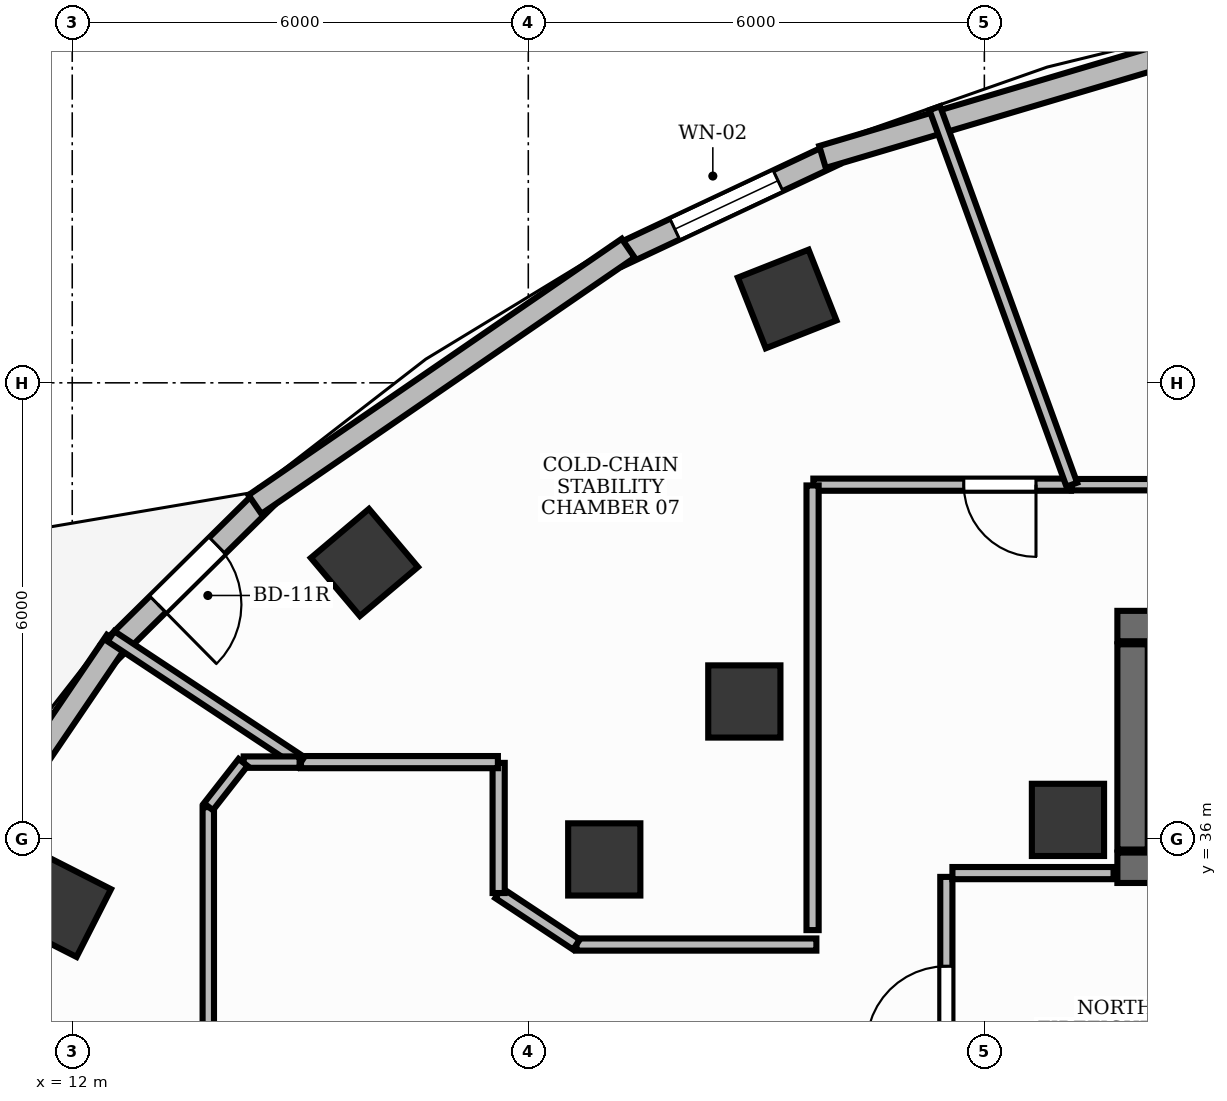
"""IFC4 building model, lengths in metres.
Left out: names, types, materials, properties, quantities, classifications, styles, units other than length and angle.
Written with IfcOpenShell. Run it as: python <this file> out.ifc"""

import sys

from ifc_helpers import new_model, si_unit, direction, frame, frame_2d, origin, origin_2d, place, context, subcontext, project, spatial, rectangle, extrude, element, fill, save


model = new_model("IFC4")
c1 = context("Model", 3, precision=1e-05, world=origin(), true_north=direction((0.0, 1.0)))
c2 = subcontext(c1, "Body", "Model", "MODEL_VIEW")
j1 = project(units=[si_unit("LENGTHUNIT", "METRE"), si_unit("PLANEANGLEUNIT", "RADIAN")], contexts=[c1])
p1 = place(None, origin())
s1 = spatial("IfcSite", under=j1, at=p1, CompositionType="ELEMENT")
p2 = place(p1, origin())
s2 = spatial("IfcBuilding", under=s1, at=p2, CompositionType="ELEMENT")
p3 = place(p2, frame((0.0, 0.0, 166.8)))
s3 = spatial("IfcBuildingStorey", under=s2, at=p3, CompositionType="ELEMENT", Elevation=166.8)
p4 = place(p3, frame((25.75, 38.8, 0.0), z_axis=(0.0, 0.0, 1.0), x_axis=(1.0, 0.0, 0.0)))
e1 = element("IfcWall", 1, at=p4, inside=s3, PredefinedType="SHEAR", context=c2, shape_type="SweptSolid", body=[
    extrude(rectangle(XDim=3.1, YDim=0.4, at=frame_2d((1.55, 0.0))), origin(), (0.0, 0.0, 1.0), 3.9),
])
p5 = place(p3, frame((25.75, 35.62, 0.0), z_axis=(0.0, 0.0, 1.0), x_axis=(1.0, 0.0, 0.0)))
e2 = element("IfcWall", 2, at=p5, inside=s3, PredefinedType="SHEAR", context=c2, shape_type="SweptSolid", body=[
    extrude(rectangle(XDim=3.1, YDim=0.4, at=frame_2d((1.55, 0.0))), origin(), (0.0, 0.0, 1.0), 3.9),
])
p6 = place(p5, frame((0.9, 0.0, 0.0)))
e3 = element("IfcOpeningElement", 3, at=p6, cuts=e2, PredefinedType="OPENING", context=c2, shape_type="SweptSolid", body=[
    extrude(rectangle(XDim=1.3, YDim=2.2, at=frame_2d((0.65, 1.1))), frame((0.0, 0.215, 0.0), z_axis=(0.0, -1.0, 0.0), x_axis=(1.0, 0.0, 0.0)), (0.0, 0.0, 1.0), 0.43),
])
p7 = place(p3, frame((25.95, 35.86, 0.0), z_axis=(0.0, 0.0, 1.0), x_axis=(0.0, 1.0, 0.0)))
e4 = element("IfcWall", 4, at=p7, inside=s3, PredefinedType="SHEAR", context=c2, shape_type="SweptSolid", body=[
    extrude(rectangle(XDim=2.7, YDim=0.4, at=frame_2d((1.35, 0.0))), origin(), (0.0, 0.0, 1.0), 3.9),
])
p8 = place(p3, frame((25.1, 36.25, -0.0), z_axis=(0.0, 0.0, 1.0), x_axis=(1.0, 0.0, 0.0)))
e5 = element("IfcColumn", 5, at=p8, inside=s3, PredefinedType="PILASTER", context=c2, shape_type="SweptSolid", body=[
    extrude(rectangle(XDim=0.95, YDim=0.95, at=origin_2d()), origin(), (0.0, 0.0, 1.0), 3.901),
])
for number, where, z_axis, x_axis in (
    (6, (21.406, 43.103, -0.0), (0.0, 0.0, 1.0), (0.93, 0.367, 0.0)),
    (7, (15.844, 39.637, -0.0), (0.0, 0.0, 1.0), (0.764, 0.645, 0.0)),
):
    element("IfcColumn", number, at=place(p3, frame(where, z_axis=z_axis, x_axis=x_axis)), inside=s3, PredefinedType="COLUMN", context=c2, shape_type="SweptSolid", body=[
        extrude(rectangle(XDim=1.0, YDim=1.0, at=origin_2d()), origin(), (0.0, 0.0, 1.0), 3.901),
    ])
p9 = place(p3, frame((20.842, 37.808, -0.0), z_axis=(0.0, 0.0, 1.0), x_axis=(1.0, 0.0, 0.0)))
e8 = element("IfcColumn", 8, at=p9, inside=s3, PredefinedType="COLUMN", context=c2, shape_type="SweptSolid", body=[
    extrude(rectangle(XDim=0.95, YDim=0.95, at=origin_2d()), origin(), (0.0, 0.0, 1.0), 3.901),
])
p10 = place(p3, frame((11.838, 35.119, -0.0), z_axis=(0.0, 0.0, 1.0), x_axis=(0.453057191132, 0.891481453292, 0.0)))
e9 = element("IfcColumn", 9, at=p10, inside=s3, PredefinedType="COLUMN", context=c2, shape_type="SweptSolid", body=[
    extrude(rectangle(XDim=1.0, YDim=1.0, at=origin_2d()), origin(), (0.0, 0.0, 1.0), 3.901),
])
p11 = place(p3, frame((19.0, 35.73, -0.0), z_axis=(0.0, 0.0, 1.0), x_axis=(1.0, 0.0, 0.0)))
e10 = element("IfcColumn", 10, at=p11, inside=s3, PredefinedType="COLUMN", context=c2, shape_type="SweptSolid", body=[
    extrude(rectangle(XDim=0.95, YDim=0.95, at=origin_2d()), origin(), (0.0, 0.0, 1.0), 3.901),
])
p12 = place(p3, frame((22.03, 45.01, 0.0), z_axis=(0.0, 0.0, 1.0), x_axis=(-0.905013842092, -0.425382117186, 0.0)))
e11 = element("IfcWall", 11, at=p12, inside=s3, PredefinedType="STANDARD", context=c2, shape_type="SweptSolid", body=[
    extrude(rectangle(XDim=3.146, YDim=0.3, at=frame_2d((1.573, 0.0))), origin(), (0.0, 0.0, 1.0), 3.9),
])
p13 = place(p12, frame((0.823, 0.0, 0.95)))
e12 = element("IfcOpeningElement", 12, at=p13, cuts=e11, PredefinedType="OPENING", context=c2, shape_type="SweptSolid", body=[
    extrude(rectangle(XDim=1.5, YDim=1.8, at=frame_2d((0.75, 0.9))), frame((0.0, 0.165, 0.0), z_axis=(0.0, -1.0, 0.0), x_axis=(1.0, 0.0, 0.0)), (0.0, 0.0, 1.0), 0.33),
])
p14 = place(p3, frame((14.546, 40.489, 0.0), z_axis=(0.0, 0.0, 1.0), x_axis=(-0.711442799636, -0.70274400947, 0.0)))
e13 = element("IfcWall", 13, at=p14, inside=s3, PredefinedType="STANDARD", context=c2, shape_type="SweptSolid", body=[
    extrude(rectangle(XDim=2.891, YDim=0.3, at=frame_2d((1.445, 0.0))), origin(), (0.0, 0.0, 1.0), 3.9),
])
p15 = place(p14, frame((0.896, 0.0, 0.0)))
e14 = element("IfcOpeningElement", 14, at=p15, cuts=e13, PredefinedType="OPENING", context=c2, shape_type="SweptSolid", body=[
    extrude(rectangle(XDim=1.1, YDim=2.15, at=frame_2d((0.55, 1.075))), frame((0.0, 0.165, 0.0), z_axis=(0.0, -1.0, 0.0), x_axis=(1.0, 0.0, 0.0)), (0.0, 0.0, 1.0), 0.33),
])
p16 = place(p3, frame((28.002, 46.791, 0.0), z_axis=(0.0, 0.0, 1.0), x_axis=(-0.958672086524, -0.284513322218, 0.0)))
e15 = element("IfcWall", 15, at=p16, inside=s3, PredefinedType="STANDARD", context=c2, shape_type="SweptSolid", body=[
    extrude(rectangle(XDim=6.396, YDim=0.3, at=frame_2d((3.198, 0.0))), origin(), (0.0, 0.0, 1.0), 3.47),
])
p17 = place(p3, frame((19.314, 43.771, 0.0), z_axis=(0.0, 0.0, 1.0), x_axis=(-0.824341970472, -0.566092144194, 0.0)))
e16 = element("IfcWall", 16, at=p17, inside=s3, PredefinedType="STANDARD", context=c2, shape_type="SweptSolid", body=[
    extrude(rectangle(XDim=5.957, YDim=0.3, at=frame_2d((2.979, 0.0))), origin(), (0.0, 0.0, 1.0), 3.9),
])
p18 = place(p3, frame((12.58, 38.601, 0.0), z_axis=(0.0, 0.0, 1.0), x_axis=(-0.561663900064, -0.827365495634, 0.0)))
e17 = element("IfcWall", 17, at=p18, inside=s3, PredefinedType="STANDARD", context=c2, shape_type="SweptSolid", body=[
    extrude(rectangle(XDim=5.438, YDim=0.3, at=frame_2d((2.719, 0.0))), origin(), (0.0, 0.0, 1.0), 3.47),
])
p19 = place(p3, frame((23.5, 32.1, 0.0), z_axis=(0.0, 0.0, 1.0), x_axis=(0.0, 1.0, 0.0)))
e18 = element("IfcWall", 18, at=p19, inside=s3, PredefinedType="PARTITIONING", context=c2, shape_type="SweptSolid", body=[
    extrude(rectangle(XDim=3.4, YDim=0.16, at=frame_2d((1.7, 0.0))), origin(), (0.0, 0.0, 1.0), 2.91),
])
p20 = place(p19, frame((1.175, 0.0, 0.0)))
e19 = element("IfcOpeningElement", 19, at=p20, cuts=e18, PredefinedType="OPENING", context=c2, shape_type="SweptSolid", body=[
    extrude(rectangle(XDim=1.05, YDim=2.15, at=frame_2d((0.525, 1.075))), frame((0.0, 0.095, 0.0), z_axis=(0.0, -1.0, 0.0), x_axis=(1.0, 0.0, 0.0)), (0.0, 0.0, 1.0), 0.19),
])
p21 = place(p3, frame((23.58, 35.55, 0.0), z_axis=(0.0, 0.0, 1.0), x_axis=(1.0, 0.0, 0.0)))
e20 = element("IfcWall", 20, at=p21, inside=s3, PredefinedType="PARTITIONING", context=c2, shape_type="SweptSolid", body=[
    extrude(rectangle(XDim=2.12, YDim=0.16, at=frame_2d((1.06, 0.0))), origin(), (0.0, 0.0, 1.0), 2.91),
])
p22 = place(p3, frame((34.059, 40.66, 0.0), z_axis=(0.0, 0.0, 1.0), x_axis=(-1.0, 0.0, 0.0)))
e21 = element("IfcWall", 21, at=p22, inside=s3, PredefinedType="PARTITIONING", context=c2, shape_type="SweptSolid", body=[
    extrude(rectangle(XDim=8.908, YDim=0.15, at=frame_2d((4.454, 0.0))), origin(), (0.0, 0.0, 1.0), 2.91),
])
p23 = place(p22, frame((0.24, 0.0, 0.0)))
e22 = element("IfcOpeningElement", 22, at=p23, cuts=e21, PredefinedType="OPENING", context=c2, shape_type="SweptSolid", body=[
    extrude(rectangle(XDim=0.95, YDim=2.15, at=frame_2d((0.475, 1.075))), frame((0.0, 0.09, 0.0), z_axis=(0.0, -1.0, 0.0), x_axis=(1.0, 0.0, 0.0)), (0.0, 0.0, 1.0), 0.18),
])
p24 = place(p3, frame((25.14, 40.66, 0.0), z_axis=(0.0, 0.0, 1.0), x_axis=(-1.0, 0.0, 0.0)))
e23 = element("IfcWall", 23, at=p24, inside=s3, PredefinedType="PARTITIONING", context=c2, shape_type="SweptSolid", body=[
    extrude(rectangle(XDim=3.39, YDim=0.16, at=frame_2d((1.695, 0.0))), origin(), (0.0, 0.0, 1.0), 2.91),
])
p25 = place(p24, frame((0.461, 0.0, 0.0)))
e24 = element("IfcOpeningElement", 24, at=p25, cuts=e23, PredefinedType="OPENING", context=c2, shape_type="SweptSolid", body=[
    extrude(rectangle(XDim=0.95, YDim=2.15, at=frame_2d((0.475, 1.075))), frame((0.0, 0.095, 0.0), z_axis=(0.0, -1.0, 0.0), x_axis=(1.0, 0.0, 0.0)), (0.0, 0.0, 1.0), 0.19),
])
p26 = place(p3, frame((13.79, 36.417, 0.0), z_axis=(0.0, 0.0, 1.0), x_axis=(0.0, -1.0, 0.0)))
e25 = element("IfcWall", 25, at=p26, inside=s3, PredefinedType="PARTITIONING", context=c2, shape_type="SweptSolid", body=[
    extrude(rectangle(XDim=4.208, YDim=0.15, at=frame_2d((2.104, 0.0))), origin(), (0.0, 0.0, 1.0), 2.91),
])
p27 = place(p26, frame((3.017, 0.0, 0.0)))
e26 = element("IfcOpeningElement", 26, at=p27, cuts=e25, PredefinedType="OPENING", context=c2, shape_type="SweptSolid", body=[
    extrude(rectangle(XDim=0.95, YDim=2.15, at=frame_2d((0.475, 1.075))), frame((0.0, 0.09, 0.0), z_axis=(0.0, -1.0, 0.0), x_axis=(1.0, 0.0, 0.0)), (0.0, 0.0, 1.0), 0.18),
])
p28 = place(p3, frame((25.151, 40.66, 0.0), z_axis=(0.0, 0.0, 1.0), x_axis=(-0.341995928267, 0.939701433993, 0.0)))
e27 = element("IfcWall", 27, at=p28, inside=s3, PredefinedType="PARTITIONING", context=c2, shape_type="SweptSolid", body=[
    extrude(rectangle(XDim=5.271, YDim=0.15, at=frame_2d((2.636, 0.0))), origin(), (0.0, 0.0, 1.0), 2.91),
])
p29 = place(p3, frame((21.74, 40.65, 0.0), z_axis=(0.0, 0.0, 1.0), x_axis=(0.0, -1.0, 0.0)))
e28 = element("IfcWall", 28, at=p29, inside=s3, PredefinedType="PARTITIONING", context=c2, shape_type="SweptSolid", body=[
    extrude(rectangle(XDim=5.85, YDim=0.16, at=frame_2d((2.925, 0.0))), origin(), (0.0, 0.0, 1.0), 2.91),
])
p30 = place(p3, frame((21.79, 34.61, 0.0), z_axis=(0.0, 0.0, 1.0), x_axis=(-1.0, 0.0, 0.0)))
e29 = element("IfcWall", 29, at=p30, inside=s3, PredefinedType="PARTITIONING", context=c2, shape_type="SweptSolid", body=[
    extrude(rectangle(XDim=3.157, YDim=0.16, at=frame_2d((1.578, 0.0))), origin(), (0.0, 0.0, 1.0), 2.91),
])
p31 = place(p3, frame((18.633, 34.61, 0.0), z_axis=(0.0, 0.0, 1.0), x_axis=(-0.833790799357, 0.552080522123, 0.0)))
e30 = element("IfcWall", 30, at=p31, inside=s3, PredefinedType="PARTITIONING", context=c2, shape_type="SweptSolid", body=[
    extrude(rectangle(XDim=1.227, YDim=0.16, at=frame_2d((0.614, 0.0))), origin(), (0.0, 0.0, 1.0), 2.91),
])
p32 = place(p3, frame((17.61, 35.288, 0.0), z_axis=(0.0, 0.0, 1.0), x_axis=(0.0, 1.0, 0.0)))
e31 = element("IfcWall", 31, at=p32, inside=s3, PredefinedType="PARTITIONING", context=c2, shape_type="SweptSolid", body=[
    extrude(rectangle(XDim=1.712, YDim=0.16, at=frame_2d((0.856, 0.0))), origin(), (0.0, 0.0, 1.0), 2.91),
])
p33 = place(p3, frame((17.6, 37.01, 0.0), z_axis=(0.0, 0.0, 1.0), x_axis=(-1.0, 0.0, 0.0)))
e32 = element("IfcWall", 32, at=p33, inside=s3, PredefinedType="PARTITIONING", context=c2, shape_type="SweptSolid", body=[
    extrude(rectangle(XDim=2.591, YDim=0.16, at=frame_2d((1.295, 0.0))), origin(), (0.0, 0.0, 1.0), 2.91),
])
p34 = place(p3, frame((15.01, 37.01, 0.0), z_axis=(0.0, 0.0, 1.0), x_axis=(-0.833750277905, 0.552141715589, 0.0)))
e33 = element("IfcWall", 33, at=p34, inside=s3, PredefinedType="PARTITIONING", context=c2, shape_type="SweptSolid", body=[
    extrude(rectangle(XDim=2.998, YDim=0.16, at=frame_2d((1.499, 0.0))), origin(), (0.0, 0.0, 1.0), 2.91),
])
p35 = place(p3, frame((14.991, 37.01, 0.0), z_axis=(0.0, 0.0, 1.0), x_axis=(-1.0, 0.0, 0.0)))
e34 = element("IfcWall", 34, at=p35, inside=s3, PredefinedType="PARTITIONING", context=c2, shape_type="SweptSolid", body=[
    extrude(rectangle(XDim=0.736, YDim=0.15, at=frame_2d((0.368, 0.0))), origin(), (0.0, 0.0, 1.0), 2.91),
])
p36 = place(p3, frame((14.248, 37.006, 0.0), z_axis=(0.0, 0.0, 1.0), x_axis=(-0.616041172792, -0.787713954063, 0.0)))
e35 = element("IfcWall", 35, at=p36, inside=s3, PredefinedType="PARTITIONING", context=c2, shape_type="SweptSolid", body=[
    extrude(rectangle(XDim=0.74, YDim=0.15, at=frame_2d((0.37, 0.0))), origin(), (0.0, 0.0, 1.0), 2.91),
])
p37 = place(p13, origin())
e36 = element("IfcWindow", 36, at=p37, inside=s3, PartitioningType="DOUBLE_PANEL_VERTICAL", PredefinedType="WINDOW", context=c2, shape_type="SweptSolid", body=[
    extrude(rectangle(XDim=1.5, YDim=1.8, at=frame_2d((0.75, 0.9))), frame((0.0, 0.03, 0.0), z_axis=(0.0, -1.0, 0.0), x_axis=(1.0, 0.0, 0.0)), (0.0, 0.0, 1.0), 0.06),
])
fill(e12, e36)
p38 = place(p15, origin())
e37 = element("IfcDoor", 37, at=p38, inside=s3, OperationType="SINGLE_SWING_RIGHT", PredefinedType="DOOR", context=c2, shape_type="SweptSolid", body=[
    extrude(rectangle(XDim=1.1, YDim=2.15, at=frame_2d((0.55, 1.075))), frame((0.0, 0.025, 0.0), z_axis=(0.0, -1.0, 0.0), x_axis=(1.0, 0.0, 0.0)), (0.0, 0.0, 1.0), 0.05),
])
fill(e14, e37)
p39 = place(p20, origin())
e38 = element("IfcDoor", 38, at=p39, inside=s3, OperationType="SINGLE_SWING_LEFT", PredefinedType="DOOR", context=c2, shape_type="SweptSolid", body=[
    extrude(rectangle(XDim=1.05, YDim=2.15, at=frame_2d((0.525, 1.075))), frame((0.0, 0.025, 0.0), z_axis=(0.0, -1.0, 0.0), x_axis=(1.0, 0.0, 0.0)), (0.0, 0.0, 1.0), 0.05),
])
fill(e19, e38)
p40 = place(p25, origin())
e39 = element("IfcDoor", 39, at=p40, inside=s3, OperationType="SINGLE_SWING_LEFT", PredefinedType="DOOR", context=c2, shape_type="SweptSolid", body=[
    extrude(rectangle(XDim=0.95, YDim=2.15, at=frame_2d((0.475, 1.075))), frame((0.0, 0.025, 0.0), z_axis=(0.0, -1.0, 0.0), x_axis=(1.0, 0.0, 0.0)), (0.0, 0.0, 1.0), 0.05),
])
fill(e24, e39)
save(model, sys.argv[1])
